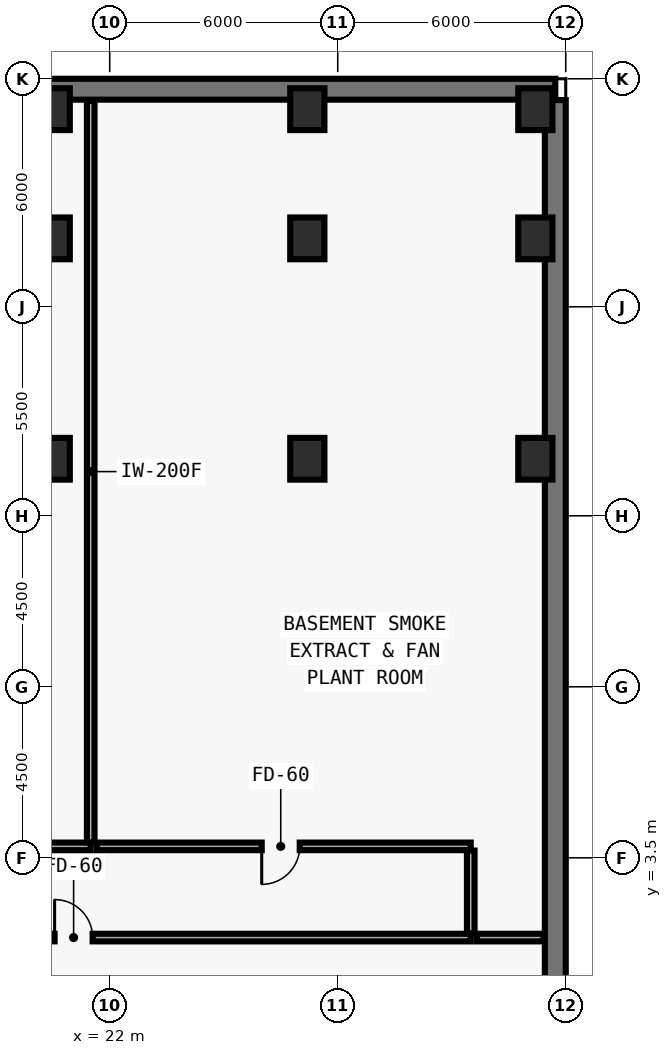
"""IFC4 building model, lengths in metres.
Left out: names, types, materials, properties, quantities, classifications, styles, units other than length and angle.
Written with IfcOpenShell. Run it as: python <this file> out.ifc"""

import sys

from ifc_helpers import new_model, si_unit, direction, frame, frame_2d, origin, origin_2d, place, context, subcontext, project, spatial, rectangle, extrude, element, fill, save


model = new_model("IFC4")
c1 = context("Model", 3, precision=1e-05, world=origin(), true_north=direction((0.0, 1.0)))
c2 = subcontext(c1, "Body", "Model", "MODEL_VIEW")
j1 = project(units=[si_unit("LENGTHUNIT", "METRE"), si_unit("PLANEANGLEUNIT", "RADIAN")], contexts=[c1])
p1 = place(None, origin())
s1 = spatial("IfcSite", under=j1, at=p1, CompositionType="ELEMENT")
p2 = place(p1, origin())
s2 = spatial("IfcBuilding", under=s1, at=p2, CompositionType="ELEMENT")
p3 = place(p2, frame((0.0, 0.0, -4.5)))
s3 = spatial("IfcBuildingStorey", under=s2, at=p3, CompositionType="ELEMENT", Elevation=-4.5)
p4 = place(p3, frame((-33.725, 23.725, 0.0), z_axis=(0.0, 0.0, 1.0), x_axis=(1.0, 0.0, 0.0)))
e1 = element("IfcWall", 1, at=p4, inside=s3, PredefinedType="SOLIDWALL", context=c2, shape_type="SweptSolid", body=[
    extrude(rectangle(XDim=67.45, YDim=0.55, at=frame_2d((33.725, 0.0))), origin(), (0.0, 0.0, 1.0), 4.492),
])
p5 = place(p3, frame((33.725, -23.44, 0.0), z_axis=(0.0, 0.0, 1.0), x_axis=(0.0, 1.0, 0.0)))
e2 = element("IfcWall", 2, at=p5, inside=s3, PredefinedType="SOLIDWALL", context=c2, shape_type="SweptSolid", body=[
    extrude(rectangle(XDim=46.88, YDim=0.55, at=frame_2d((23.44, 0.0))), origin(), (0.0, 0.0, 1.0), 4.492),
])
for number, where, z_axis, x_axis in (
    (3, (20.5, 14.0, 0.0), (0.0, 0.0, 1.0), (1.0, 0.0, 0.0)),
    (4, (20.5, 19.8, 0.0), (0.0, 0.0, 1.0), (1.0, 0.0, 0.0)),
    (5, (20.5, 23.2, 0.0), (0.0, 0.0, 1.0), (1.0, 0.0, 0.0)),
    (6, (27.2, 14.0, 0.0), (0.0, 0.0, 1.0), (1.0, 0.0, 0.0)),
    (7, (27.2, 19.8, 0.0), (0.0, 0.0, 1.0), (1.0, 0.0, 0.0)),
    (8, (27.2, 23.2, 0.0), (0.0, 0.0, 1.0), (1.0, 0.0, 0.0)),
    (9, (33.2, 14.0, 0.0), (0.0, 0.0, 1.0), (1.0, 0.0, 0.0)),
    (10, (33.2, 19.8, 0.0), (0.0, 0.0, 1.0), (1.0, 0.0, 0.0)),
    (11, (33.2, 23.2, 0.0), (0.0, 0.0, 1.0), (1.0, 0.0, 0.0)),
):
    element("IfcColumn", number, at=place(p3, frame(where, z_axis=z_axis, x_axis=x_axis)), inside=s3, PredefinedType="COLUMN", context=c2, shape_type="SweptSolid", body=[
        extrude(rectangle(XDim=0.9, YDim=1.1, at=origin_2d()), origin(), (0.0, 0.0, 1.0), 4.475),
    ])
p6 = place(p3, frame((10.6, 1.4, 0.0), z_axis=(0.0, 0.0, 1.0), x_axis=(1.0, 0.0, 0.0)))
e12 = element("IfcWall", 12, at=p6, inside=s3, PredefinedType="MOVABLE", context=c2, shape_type="SweptSolid", body=[
    extrude(rectangle(XDim=20.9, YDim=0.2, at=frame_2d((10.45, 0.0))), origin(), (0.0, 0.0, 1.0), 4.18),
])
p7 = place(p6, frame((9.95, 0.0, 0.0)))
e13 = element("IfcOpeningElement", 13, at=p7, cuts=e12, PredefinedType="OPENING", context=c2, shape_type="SweptSolid", body=[
    extrude(rectangle(XDim=1.0, YDim=2.1, at=frame_2d((0.5, 1.05))), frame((0.0, 0.11, 0.0), z_axis=(0.0, -1.0, 0.0), x_axis=(1.0, 0.0, 0.0)), (0.0, 0.0, 1.0), 0.22),
])
p8 = place(p3, frame((21.5, 3.8, 0.0), z_axis=(0.0, 0.0, 1.0), x_axis=(-1.0, 0.0, 0.0)))
e14 = element("IfcWall", 14, at=p8, inside=s3, PredefinedType="MOVABLE", context=c2, shape_type="SweptSolid", body=[
    extrude(rectangle(XDim=10.9, YDim=0.2, at=frame_2d((5.45, 0.0))), origin(), (0.0, 0.0, 1.0), 4.18),
])
p9 = place(p8, frame((4.95, 0.0, 0.0)))
e15 = element("IfcOpeningElement", 15, at=p9, cuts=e14, PredefinedType="OPENING", context=c2, shape_type="SweptSolid", body=[
    extrude(rectangle(XDim=1.0, YDim=2.1, at=frame_2d((0.5, 1.05))), frame((0.0, 0.11, 0.0), z_axis=(0.0, -1.0, 0.0), x_axis=(1.0, 0.0, 0.0)), (0.0, 0.0, 1.0), 0.22),
])
p10 = place(p3, frame((31.5, 3.8, 0.0), z_axis=(0.0, 0.0, 1.0), x_axis=(-1.0, 0.0, 0.0)))
e16 = element("IfcWall", 16, at=p10, inside=s3, PredefinedType="MOVABLE", context=c2, shape_type="SweptSolid", body=[
    extrude(rectangle(XDim=9.84, YDim=0.2, at=frame_2d((4.92, 0.0))), origin(), (0.0, 0.0, 1.0), 4.18),
])
p11 = place(p10, frame((4.5, 0.0, 0.0)))
e17 = element("IfcOpeningElement", 17, at=p11, cuts=e16, PredefinedType="OPENING", context=c2, shape_type="SweptSolid", body=[
    extrude(rectangle(XDim=1.0, YDim=2.1, at=frame_2d((0.5, 1.05))), frame((0.0, 0.11, 0.0), z_axis=(0.0, -1.0, 0.0), x_axis=(1.0, 0.0, 0.0)), (0.0, 0.0, 1.0), 0.22),
])
p12 = place(p3, frame((31.5, 1.51, 0.0), z_axis=(0.0, 0.0, 1.0), x_axis=(0.0, 1.0, 0.0)))
e18 = element("IfcWall", 18, at=p12, inside=s3, PredefinedType="MOVABLE", context=c2, shape_type="SweptSolid", body=[
    extrude(rectangle(XDim=2.18, YDim=0.2, at=frame_2d((1.09, 0.0))), origin(), (0.0, 0.0, 1.0), 4.18),
])
p13 = place(p3, frame((31.66, 1.4, 0.0), z_axis=(0.0, 0.0, 1.0), x_axis=(1.0, 0.0, 0.0)))
e19 = element("IfcWall", 19, at=p13, inside=s3, PredefinedType="MOVABLE", context=c2, shape_type="SweptSolid", body=[
    extrude(rectangle(XDim=1.755, YDim=0.2, at=frame_2d((0.877, 0.0))), origin(), (0.0, 0.0, 1.0), 4.18),
])
p14 = place(p3, frame((21.5, 23.415, 0.0), z_axis=(0.0, 0.0, 1.0), x_axis=(0.0, -1.0, 0.0)))
e20 = element("IfcWall", 20, at=p14, inside=s3, PredefinedType="MOVABLE", context=c2, shape_type="SweptSolid", body=[
    extrude(rectangle(XDim=19.505, YDim=0.2, at=frame_2d((9.752, 0.0))), origin(), (0.0, 0.0, 1.0), 4.18),
])
p15 = place(p7, origin())
e21 = element("IfcDoor", 21, at=p15, inside=s3, OperationType="SINGLE_SWING_LEFT", PredefinedType="DOOR", context=c2, shape_type="SweptSolid", body=[
    extrude(rectangle(XDim=1.0, YDim=2.1, at=frame_2d((0.5, 1.05))), frame((0.0, 0.025, 0.0), z_axis=(0.0, -1.0, 0.0), x_axis=(1.0, 0.0, 0.0)), (0.0, 0.0, 1.0), 0.05),
])
fill(e13, e21)
p16 = place(p11, origin())
e22 = element("IfcDoor", 22, at=p16, inside=s3, OperationType="SINGLE_SWING_RIGHT", PredefinedType="DOOR", context=c2, shape_type="SweptSolid", body=[
    extrude(rectangle(XDim=1.0, YDim=2.1, at=frame_2d((0.5, 1.05))), frame((0.0, 0.025, 0.0), z_axis=(0.0, -1.0, 0.0), x_axis=(1.0, 0.0, 0.0)), (0.0, 0.0, 1.0), 0.05),
])
fill(e17, e22)
save(model, sys.argv[1])
